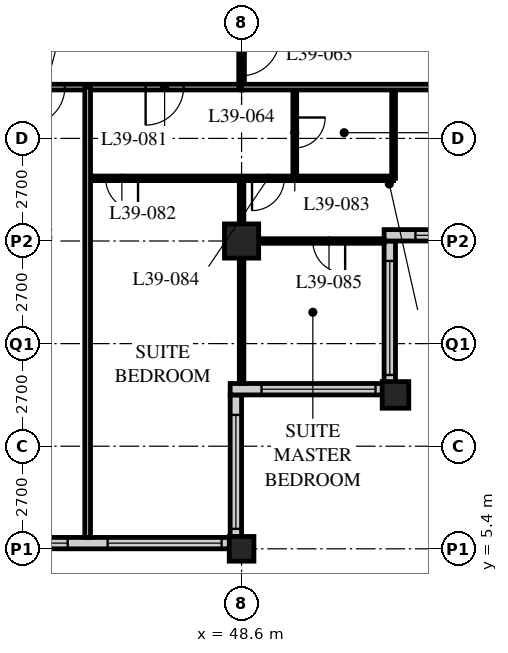
"""IFC4 building model, lengths in metres.
Left out: names, types, materials, properties, quantities, classifications, styles, units other than length and angle.
Written with IfcOpenShell. Run it as: python <this file> out.ifc"""

import sys

from ifc_helpers import new_model, si_unit, direction, frame, frame_2d, origin, origin_2d, place, context, subcontext, project, spatial, rectangle, hollow_rectangle, extrude, element, fill, save


model = new_model("IFC4")
c1 = context("Model", 3, precision=1e-05, world=origin(), true_north=direction((0.0, 1.0)))
c2 = subcontext(c1, "Body", "Model", "MODEL_VIEW")
j1 = project(units=[si_unit("LENGTHUNIT", "METRE"), si_unit("PLANEANGLEUNIT", "RADIAN")], contexts=[c1])
p1 = place(None, origin())
s1 = spatial("IfcSite", under=j1, at=p1, CompositionType="ELEMENT")
p2 = place(p1, origin())
s2 = spatial("IfcBuilding", under=s1, at=p2, CompositionType="ELEMENT")
p3 = place(p2, frame((0.0, 0.0, 151.0)))
s3 = spatial("IfcBuildingStorey", under=s2, at=p3, CompositionType="ELEMENT", Elevation=151.0)
p4 = place(p3, frame((48.6, 5.4, 0.0), z_axis=(0.0, 0.0, 1.0), x_axis=(1.0, 0.0, 0.0)))
e1 = element("IfcColumn", 1, at=p4, inside=s3, PredefinedType="COLUMN", context=c2, shape_type="SweptSolid", body=[
    extrude(hollow_rectangle(XDim=0.65, YDim=0.65, WallThickness=0.055, at=origin_2d()), origin(), (0.0, 0.0, 1.0), 3.4),
])
p5 = place(p3, frame((48.6, 13.5, 0.0), z_axis=(0.0, 0.0, 1.0), x_axis=(1.0, 0.0, 0.0)))
e2 = element("IfcColumn", 2, at=p5, inside=s3, PredefinedType="COLUMN", context=c2, shape_type="SweptSolid", body=[
    extrude(hollow_rectangle(XDim=0.9, YDim=0.9, WallThickness=0.1, at=origin_2d()), origin(), (0.0, 0.0, 1.0), 3.4),
])
p6 = place(p3, frame((52.65, 9.45, 0.0), z_axis=(0.0, 0.0, 1.0), x_axis=(1.0, 0.0, 0.0)))
e3 = element("IfcColumn", 3, at=p6, inside=s3, PredefinedType="COLUMN", context=c2, shape_type="SweptSolid", body=[
    extrude(hollow_rectangle(XDim=0.7, YDim=0.7, WallThickness=0.07, at=origin_2d()), origin(), (0.0, 0.0, 1.0), 3.4),
])
p7 = place(p3, frame((8.4, 5.55, 0.0), z_axis=(0.0, 0.0, 1.0), x_axis=(1.0, 0.0, 0.0)))
e4 = element("IfcWall", 4, at=p7, inside=s3, PredefinedType="SOLIDWALL", context=c2, shape_type="SweptSolid", body=[
    extrude(rectangle(XDim=40.2, YDim=0.3, at=frame_2d((20.1, 0.0))), origin(), (0.0, 0.0, 1.0), 3.19),
])
p8 = place(p7, frame((0.225, 0.0, 0.9)))
e5 = element("IfcOpeningElement", 5, at=p8, cuts=e4, PredefinedType="OPENING", context=c2, shape_type="SweptSolid", body=[
    extrude(rectangle(XDim=3.0, YDim=1.4, at=frame_2d((1.5, 0.7))), frame((0.0, 0.16, 0.0), z_axis=(0.0, -1.0, 0.0), x_axis=(1.0, 0.0, 0.0)), (0.0, 0.0, 1.0), 0.32),
])
p9 = place(p7, frame((4.275, 0.0, 0.9)))
e6 = element("IfcOpeningElement", 6, at=p9, cuts=e4, PredefinedType="OPENING", context=c2, shape_type="SweptSolid", body=[
    extrude(rectangle(XDim=3.0, YDim=1.4, at=frame_2d((1.5, 0.7))), frame((0.0, 0.16, 0.0), z_axis=(0.0, -1.0, 0.0), x_axis=(1.0, 0.0, 0.0)), (0.0, 0.0, 1.0), 0.32),
])
p10 = place(p7, frame((8.325, 0.0, 0.9)))
e7 = element("IfcOpeningElement", 7, at=p10, cuts=e4, PredefinedType="OPENING", context=c2, shape_type="SweptSolid", body=[
    extrude(rectangle(XDim=3.0, YDim=1.4, at=frame_2d((1.5, 0.7))), frame((0.0, 0.16, 0.0), z_axis=(0.0, -1.0, 0.0), x_axis=(1.0, 0.0, 0.0)), (0.0, 0.0, 1.0), 0.32),
])
p11 = place(p7, frame((12.375, 0.0, 0.9)))
e8 = element("IfcOpeningElement", 8, at=p11, cuts=e4, PredefinedType="OPENING", context=c2, shape_type="SweptSolid", body=[
    extrude(rectangle(XDim=3.0, YDim=1.4, at=frame_2d((1.5, 0.7))), frame((0.0, 0.16, 0.0), z_axis=(0.0, -1.0, 0.0), x_axis=(1.0, 0.0, 0.0)), (0.0, 0.0, 1.0), 0.32),
])
p12 = place(p7, frame((16.425, 0.0, 0.9)))
e9 = element("IfcOpeningElement", 9, at=p12, cuts=e4, PredefinedType="OPENING", context=c2, shape_type="SweptSolid", body=[
    extrude(rectangle(XDim=3.0, YDim=1.4, at=frame_2d((1.5, 0.7))), frame((0.0, 0.16, 0.0), z_axis=(0.0, -1.0, 0.0), x_axis=(1.0, 0.0, 0.0)), (0.0, 0.0, 1.0), 0.32),
])
p13 = place(p7, frame((20.475, 0.0, 0.9)))
e10 = element("IfcOpeningElement", 10, at=p13, cuts=e4, PredefinedType="OPENING", context=c2, shape_type="SweptSolid", body=[
    extrude(rectangle(XDim=3.0, YDim=1.4, at=frame_2d((1.5, 0.7))), frame((0.0, 0.16, 0.0), z_axis=(0.0, -1.0, 0.0), x_axis=(1.0, 0.0, 0.0)), (0.0, 0.0, 1.0), 0.32),
])
p14 = place(p7, frame((24.525, 0.0, 0.9)))
e11 = element("IfcOpeningElement", 11, at=p14, cuts=e4, PredefinedType="OPENING", context=c2, shape_type="SweptSolid", body=[
    extrude(rectangle(XDim=3.0, YDim=1.4, at=frame_2d((1.5, 0.7))), frame((0.0, 0.16, 0.0), z_axis=(0.0, -1.0, 0.0), x_axis=(1.0, 0.0, 0.0)), (0.0, 0.0, 1.0), 0.32),
])
p15 = place(p7, frame((28.575, 0.0, 0.9)))
e12 = element("IfcOpeningElement", 12, at=p15, cuts=e4, PredefinedType="OPENING", context=c2, shape_type="SweptSolid", body=[
    extrude(rectangle(XDim=3.0, YDim=1.4, at=frame_2d((1.5, 0.7))), frame((0.0, 0.16, 0.0), z_axis=(0.0, -1.0, 0.0), x_axis=(1.0, 0.0, 0.0)), (0.0, 0.0, 1.0), 0.32),
])
p16 = place(p7, frame((32.625, 0.0, 0.9)))
e13 = element("IfcOpeningElement", 13, at=p16, cuts=e4, PredefinedType="OPENING", context=c2, shape_type="SweptSolid", body=[
    extrude(rectangle(XDim=3.0, YDim=1.4, at=frame_2d((1.5, 0.7))), frame((0.0, 0.16, 0.0), z_axis=(0.0, -1.0, 0.0), x_axis=(1.0, 0.0, 0.0)), (0.0, 0.0, 1.0), 0.32),
])
p17 = place(p7, frame((36.675, 0.0, 0.9)))
e14 = element("IfcOpeningElement", 14, at=p17, cuts=e4, PredefinedType="OPENING", context=c2, shape_type="SweptSolid", body=[
    extrude(rectangle(XDim=3.0, YDim=1.4, at=frame_2d((1.5, 0.7))), frame((0.0, 0.16, 0.0), z_axis=(0.0, -1.0, 0.0), x_axis=(1.0, 0.0, 0.0)), (0.0, 0.0, 1.0), 0.32),
])
p18 = place(p3, frame((48.45, 5.7, 0.0), z_axis=(0.0, 0.0, 1.0), x_axis=(0.0, 1.0, 0.0)))
e15 = element("IfcWall", 15, at=p18, inside=s3, PredefinedType="SOLIDWALL", context=c2, shape_type="SweptSolid", body=[
    extrude(rectangle(XDim=3.75, YDim=0.3, at=frame_2d((1.875, 0.0))), origin(), (0.0, 0.0, 1.0), 3.19),
])
p19 = place(p18, frame((0.225, 0.0, 0.9)))
e16 = element("IfcOpeningElement", 16, at=p19, cuts=e15, PredefinedType="OPENING", context=c2, shape_type="SweptSolid", body=[
    extrude(rectangle(XDim=3.0, YDim=1.4, at=frame_2d((1.5, 0.7))), frame((0.0, 0.16, 0.0), z_axis=(0.0, -1.0, 0.0), x_axis=(1.0, 0.0, 0.0)), (0.0, 0.0, 1.0), 0.32),
])
p20 = place(p3, frame((48.3, 9.6, 0.0), z_axis=(0.0, 0.0, 1.0), x_axis=(1.0, 0.0, 0.0)))
e17 = element("IfcWall", 17, at=p20, inside=s3, PredefinedType="SOLIDWALL", context=c2, shape_type="SweptSolid", body=[
    extrude(rectangle(XDim=4.35, YDim=0.3, at=frame_2d((2.175, 0.0))), origin(), (0.0, 0.0, 1.0), 3.19),
])
p21 = place(p20, frame((0.825, 0.0, 0.9)))
e18 = element("IfcOpeningElement", 18, at=p21, cuts=e17, PredefinedType="OPENING", context=c2, shape_type="SweptSolid", body=[
    extrude(rectangle(XDim=3.0, YDim=1.4, at=frame_2d((1.5, 0.7))), frame((0.0, 0.16, 0.0), z_axis=(0.0, -1.0, 0.0), x_axis=(1.0, 0.0, 0.0)), (0.0, 0.0, 1.0), 0.32),
])
p22 = place(p3, frame((52.5, 9.75, 0.0), z_axis=(0.0, 0.0, 1.0), x_axis=(0.0, 1.0, 0.0)))
e19 = element("IfcWall", 19, at=p22, inside=s3, PredefinedType="SOLIDWALL", context=c2, shape_type="SweptSolid", body=[
    extrude(rectangle(XDim=3.75, YDim=0.3, at=frame_2d((1.875, 0.0))), origin(), (0.0, 0.0, 1.0), 3.19),
])
p23 = place(p22, frame((0.225, 0.0, 0.9)))
e20 = element("IfcOpeningElement", 20, at=p23, cuts=e19, PredefinedType="OPENING", context=c2, shape_type="SweptSolid", body=[
    extrude(rectangle(XDim=3.0, YDim=1.4, at=frame_2d((1.5, 0.7))), frame((0.0, 0.16, 0.0), z_axis=(0.0, -1.0, 0.0), x_axis=(1.0, 0.0, 0.0)), (0.0, 0.0, 1.0), 0.32),
])
p24 = place(p3, frame((52.35, 13.65, 0.0), z_axis=(0.0, 0.0, 1.0), x_axis=(1.0, 0.0, 0.0)))
e21 = element("IfcWall", 21, at=p24, inside=s3, PredefinedType="SOLIDWALL", context=c2, shape_type="SweptSolid", body=[
    extrude(rectangle(XDim=4.35, YDim=0.3, at=frame_2d((2.175, 0.0))), origin(), (0.0, 0.0, 1.0), 3.19),
])
p25 = place(p24, frame((0.825, 0.0, 0.9)))
e22 = element("IfcOpeningElement", 22, at=p25, cuts=e21, PredefinedType="OPENING", context=c2, shape_type="SweptSolid", body=[
    extrude(rectangle(XDim=3.0, YDim=1.4, at=frame_2d((1.5, 0.7))), frame((0.0, 0.16, 0.0), z_axis=(0.0, -1.0, 0.0), x_axis=(1.0, 0.0, 0.0)), (0.0, 0.0, 1.0), 0.32),
])
p26 = place(p3, frame((8.1, 17.55, 0.0), z_axis=(0.0, 0.0, 1.0), x_axis=(1.0, 0.0, 0.0)))
e23 = element("IfcWall", 23, at=p26, inside=s3, PredefinedType="PARTITIONING", context=c2, shape_type="SweptSolid", body=[
    extrude(rectangle(XDim=40.5, YDim=0.15, at=frame_2d((20.25, 0.0))), origin(), (0.0, 0.0, 1.0), 3.19),
])
p27 = place(p26, frame((10.0, 0.0, 0.0)))
e24 = element("IfcOpeningElement", 24, at=p27, cuts=e23, PredefinedType="OPENING", context=c2, shape_type="SweptSolid", body=[
    extrude(rectangle(XDim=1.0, YDim=2.1, at=frame_2d((0.5, 1.05))), frame((0.0, 0.085, 0.0), z_axis=(0.0, -1.0, 0.0), x_axis=(1.0, 0.0, 0.0)), (0.0, 0.0, 1.0), 0.17),
])
p28 = place(p26, frame((22.15, 0.0, 0.0)))
e25 = element("IfcOpeningElement", 25, at=p28, cuts=e23, PredefinedType="OPENING", context=c2, shape_type="SweptSolid", body=[
    extrude(rectangle(XDim=1.0, YDim=2.1, at=frame_2d((0.5, 1.05))), frame((0.0, 0.085, 0.0), z_axis=(0.0, -1.0, 0.0), x_axis=(1.0, 0.0, 0.0)), (0.0, 0.0, 1.0), 0.17),
])
p29 = place(p26, frame((30.8, 0.0, 0.0)))
e26 = element("IfcOpeningElement", 26, at=p29, cuts=e23, PredefinedType="OPENING", context=c2, shape_type="SweptSolid", body=[
    extrude(rectangle(XDim=1.0, YDim=2.1, at=frame_2d((0.5, 1.05))), frame((0.0, 0.085, 0.0), z_axis=(0.0, -1.0, 0.0), x_axis=(1.0, 0.0, 0.0)), (0.0, 0.0, 1.0), 0.17),
])
p30 = place(p26, frame((34.85, 0.0, 0.0)))
e27 = element("IfcOpeningElement", 27, at=p30, cuts=e23, PredefinedType="OPENING", context=c2, shape_type="SweptSolid", body=[
    extrude(rectangle(XDim=1.0, YDim=2.1, at=frame_2d((0.5, 1.05))), frame((0.0, 0.085, 0.0), z_axis=(0.0, -1.0, 0.0), x_axis=(1.0, 0.0, 0.0)), (0.0, 0.0, 1.0), 0.17),
])
p31 = place(p26, frame((1.525, 0.0, 0.0)))
e28 = element("IfcOpeningElement", 28, at=p31, cuts=e23, PredefinedType="OPENING", context=c2, shape_type="SweptSolid", body=[
    extrude(rectangle(XDim=1.0, YDim=2.1, at=frame_2d((0.5, 1.05))), frame((0.0, 0.085, 0.0), z_axis=(0.0, -1.0, 0.0), x_axis=(1.0, 0.0, 0.0)), (0.0, 0.0, 1.0), 0.17),
])
p32 = place(p26, frame((37.975, 0.0, 0.0)))
e29 = element("IfcOpeningElement", 29, at=p32, cuts=e23, PredefinedType="OPENING", context=c2, shape_type="SweptSolid", body=[
    extrude(rectangle(XDim=1.0, YDim=2.1, at=frame_2d((0.5, 1.05))), frame((0.0, 0.085, 0.0), z_axis=(0.0, -1.0, 0.0), x_axis=(1.0, 0.0, 0.0)), (0.0, 0.0, 1.0), 0.17),
])
p33 = place(p3, frame((48.6, 17.55, 0.0), z_axis=(0.0, 0.0, 1.0), x_axis=(0.0, 1.0, 0.0)))
e30 = element("IfcWall", 30, at=p33, inside=s3, PredefinedType="PARTITIONING", context=c2, shape_type="SweptSolid", body=[
    extrude(rectangle(XDim=28.35, YDim=0.15, at=frame_2d((14.175, 0.0))), origin(), (0.0, 0.0, 1.0), 2.42),
])
p34 = place(p33, frame((0.3, 0.0, 0.0)))
e31 = element("IfcOpeningElement", 31, at=p34, cuts=e30, PredefinedType="OPENING", context=c2, shape_type="SweptSolid", body=[
    extrude(rectangle(XDim=1.0, YDim=2.1, at=frame_2d((0.5, 1.05))), frame((0.0, 0.085, 0.0), z_axis=(0.0, -1.0, 0.0), x_axis=(1.0, 0.0, 0.0)), (0.0, 0.0, 1.0), 0.17),
])
p35 = place(p33, frame((6.5, 0.0, 0.0)))
e32 = element("IfcOpeningElement", 32, at=p35, cuts=e30, PredefinedType="OPENING", context=c2, shape_type="SweptSolid", body=[
    extrude(rectangle(XDim=1.0, YDim=2.1, at=frame_2d((0.5, 1.05))), frame((0.0, 0.085, 0.0), z_axis=(0.0, -1.0, 0.0), x_axis=(1.0, 0.0, 0.0)), (0.0, 0.0, 1.0), 0.17),
])
p36 = place(p33, frame((13.675, 0.0, 0.0)))
e33 = element("IfcOpeningElement", 33, at=p36, cuts=e30, PredefinedType="OPENING", context=c2, shape_type="SweptSolid", body=[
    extrude(rectangle(XDim=1.0, YDim=2.1, at=frame_2d((0.5, 1.05))), frame((0.0, 0.085, 0.0), z_axis=(0.0, -1.0, 0.0), x_axis=(1.0, 0.0, 0.0)), (0.0, 0.0, 1.0), 0.17),
])
p37 = place(p33, frame((22.7, 0.0, 0.0)))
e34 = element("IfcOpeningElement", 34, at=p37, cuts=e30, PredefinedType="OPENING", context=c2, shape_type="SweptSolid", body=[
    extrude(rectangle(XDim=1.0, YDim=2.1, at=frame_2d((0.5, 1.05))), frame((0.0, 0.085, 0.0), z_axis=(0.0, -1.0, 0.0), x_axis=(1.0, 0.0, 0.0)), (0.0, 0.0, 1.0), 0.17),
])
p38 = place(p33, frame((24.9, 0.0, 0.0)))
e35 = element("IfcOpeningElement", 35, at=p38, cuts=e30, PredefinedType="OPENING", context=c2, shape_type="SweptSolid", body=[
    extrude(rectangle(XDim=1.0, YDim=2.1, at=frame_2d((0.5, 1.05))), frame((0.0, 0.085, 0.0), z_axis=(0.0, -1.0, 0.0), x_axis=(1.0, 0.0, 0.0)), (0.0, 0.0, 1.0), 0.17),
])
p39 = place(p3, frame((44.55, 15.15, 0.0), z_axis=(0.0, 0.0, 1.0), x_axis=(1.0, 0.0, 0.0)))
e36 = element("IfcWall", 36, at=p39, inside=s3, PredefinedType="PARTITIONING", context=c2, shape_type="SweptSolid", body=[
    extrude(rectangle(XDim=8.05, YDim=0.12, at=frame_2d((4.025, 0.0))), origin(), (0.0, 0.0, 1.0), 3.19),
])
p40 = place(p39, frame((0.475, 0.0, 0.0)))
e37 = element("IfcOpeningElement", 37, at=p40, cuts=e36, PredefinedType="OPENING", context=c2, shape_type="SweptSolid", body=[
    extrude(rectangle(XDim=0.85, YDim=2.1, at=frame_2d((0.425, 1.05))), frame((0.0, 0.07, 0.0), z_axis=(0.0, -1.0, 0.0), x_axis=(1.0, 0.0, 0.0)), (0.0, 0.0, 1.0), 0.14),
])
p41 = place(p39, frame((4.325, 0.0, 0.0)))
e38 = element("IfcOpeningElement", 38, at=p41, cuts=e36, PredefinedType="OPENING", context=c2, shape_type="SweptSolid", body=[
    extrude(rectangle(XDim=0.85, YDim=2.1, at=frame_2d((0.425, 1.05))), frame((0.0, 0.07, 0.0), z_axis=(0.0, -1.0, 0.0), x_axis=(1.0, 0.0, 0.0)), (0.0, 0.0, 1.0), 0.14),
])
p42 = place(p3, frame((50.0, 17.55, 0.0), z_axis=(0.0, 0.0, 1.0), x_axis=(0.0, -1.0, 0.0)))
e39 = element("IfcWall", 39, at=p42, inside=s3, PredefinedType="PARTITIONING", context=c2, shape_type="SweptSolid", body=[
    extrude(rectangle(XDim=2.4, YDim=0.1, at=frame_2d((1.2, 0.0))), origin(), (0.0, 0.0, 1.0), 3.19),
])
p43 = place(p42, frame((0.8, 0.0, 0.0)))
e40 = element("IfcOpeningElement", 40, at=p43, cuts=e39, PredefinedType="OPENING", context=c2, shape_type="SweptSolid", body=[
    extrude(rectangle(XDim=0.8, YDim=2.1, at=frame_2d((0.4, 1.05))), frame((0.0, 0.06, 0.0), z_axis=(0.0, -1.0, 0.0), x_axis=(1.0, 0.0, 0.0)), (0.0, 0.0, 1.0), 0.12),
])
p44 = place(p3, frame((52.6, 17.55, 0.0), z_axis=(0.0, 0.0, 1.0), x_axis=(0.0, -1.0, 0.0)))
e41 = element("IfcWall", 41, at=p44, inside=s3, PredefinedType="PARTITIONING", context=c2, shape_type="SweptSolid", body=[
    extrude(rectangle(XDim=2.4, YDim=0.1, at=frame_2d((1.2, 0.0))), origin(), (0.0, 0.0, 1.0), 3.19),
])
p45 = place(p3, frame((48.6, 15.15, 0.0), z_axis=(0.0, 0.0, 1.0), x_axis=(0.0, -1.0, 0.0)))
e42 = element("IfcWall", 42, at=p45, inside=s3, PredefinedType="PARTITIONING", context=c2, shape_type="SweptSolid", body=[
    extrude(rectangle(XDim=5.4, YDim=0.12, at=frame_2d((2.7, 0.0))), origin(), (0.0, 0.0, 1.0), 2.42),
])
p46 = place(p3, frame((48.6, 13.5, 0.0), z_axis=(0.0, 0.0, 1.0), x_axis=(1.0, 0.0, 0.0)))
e43 = element("IfcWall", 43, at=p46, inside=s3, PredefinedType="PARTITIONING", context=c2, shape_type="SweptSolid", body=[
    extrude(rectangle(XDim=3.75, YDim=0.12, at=frame_2d((1.875, 0.0))), origin(), (0.0, 0.0, 1.0), 2.42),
])
p47 = place(p46, frame((1.875, 0.0, 0.0)))
e44 = element("IfcOpeningElement", 44, at=p47, cuts=e43, PredefinedType="OPENING", context=c2, shape_type="SweptSolid", body=[
    extrude(rectangle(XDim=0.85, YDim=2.1, at=frame_2d((0.425, 1.05))), frame((0.0, 0.07, 0.0), z_axis=(0.0, -1.0, 0.0), x_axis=(1.0, 0.0, 0.0)), (0.0, 0.0, 1.0), 0.14),
])
p48 = place(p3, frame((48.6, 17.55, 0.0), z_axis=(0.0, 0.0, 1.0), x_axis=(1.0, 0.0, 0.0)))
e45 = element("IfcWall", 45, at=p48, inside=s3, PredefinedType="PARTITIONING", context=c2, shape_type="SweptSolid", body=[
    extrude(rectangle(XDim=7.8, YDim=0.15, at=frame_2d((3.9, 0.0))), origin(), (0.0, 0.0, 1.0), 3.19),
])
p49 = place(p3, frame((44.55, 17.55, 0.0), z_axis=(0.0, 0.0, 1.0), x_axis=(0.0, -1.0, 0.0)))
e46 = element("IfcWall", 46, at=p49, inside=s3, PredefinedType="PARTITIONING", context=c2, shape_type="SweptSolid", body=[
    extrude(rectangle(XDim=11.85, YDim=0.15, at=frame_2d((5.925, 0.0))), origin(), (0.0, 0.0, 1.0), 3.19),
])
p50 = place(p16, origin())
e47 = element("IfcWindow", 47, at=p50, inside=s3, PartitioningType="SINGLE_PANEL", PredefinedType="WINDOW", context=c2, shape_type="SweptSolid", body=[
    extrude(rectangle(XDim=3.0, YDim=1.4, at=frame_2d((1.5, 0.7))), frame((0.0, 0.03, 0.0), z_axis=(0.0, -1.0, 0.0), x_axis=(1.0, 0.0, 0.0)), (0.0, 0.0, 1.0), 0.06),
])
fill(e13, e47)
p51 = place(p17, origin())
e48 = element("IfcWindow", 48, at=p51, inside=s3, PartitioningType="SINGLE_PANEL", PredefinedType="WINDOW", context=c2, shape_type="SweptSolid", body=[
    extrude(rectangle(XDim=3.0, YDim=1.4, at=frame_2d((1.5, 0.7))), frame((0.0, 0.03, 0.0), z_axis=(0.0, -1.0, 0.0), x_axis=(1.0, 0.0, 0.0)), (0.0, 0.0, 1.0), 0.06),
])
fill(e14, e48)
p52 = place(p19, origin())
e49 = element("IfcWindow", 49, at=p52, inside=s3, PartitioningType="SINGLE_PANEL", PredefinedType="WINDOW", context=c2, shape_type="SweptSolid", body=[
    extrude(rectangle(XDim=3.0, YDim=1.4, at=frame_2d((1.5, 0.7))), frame((0.0, 0.03, 0.0), z_axis=(0.0, -1.0, 0.0), x_axis=(1.0, 0.0, 0.0)), (0.0, 0.0, 1.0), 0.06),
])
fill(e16, e49)
p53 = place(p21, origin())
e50 = element("IfcWindow", 50, at=p53, inside=s3, PartitioningType="SINGLE_PANEL", PredefinedType="WINDOW", context=c2, shape_type="SweptSolid", body=[
    extrude(rectangle(XDim=3.0, YDim=1.4, at=frame_2d((1.5, 0.7))), frame((0.0, 0.03, 0.0), z_axis=(0.0, -1.0, 0.0), x_axis=(1.0, 0.0, 0.0)), (0.0, 0.0, 1.0), 0.06),
])
fill(e18, e50)
p54 = place(p23, origin())
e51 = element("IfcWindow", 51, at=p54, inside=s3, PartitioningType="SINGLE_PANEL", PredefinedType="WINDOW", context=c2, shape_type="SweptSolid", body=[
    extrude(rectangle(XDim=3.0, YDim=1.4, at=frame_2d((1.5, 0.7))), frame((0.0, 0.03, 0.0), z_axis=(0.0, -1.0, 0.0), x_axis=(1.0, 0.0, 0.0)), (0.0, 0.0, 1.0), 0.06),
])
fill(e20, e51)
p55 = place(p25, origin())
e52 = element("IfcWindow", 52, at=p55, inside=s3, PartitioningType="SINGLE_PANEL", PredefinedType="WINDOW", context=c2, shape_type="SweptSolid", body=[
    extrude(rectangle(XDim=3.0, YDim=1.4, at=frame_2d((1.5, 0.7))), frame((0.0, 0.03, 0.0), z_axis=(0.0, -1.0, 0.0), x_axis=(1.0, 0.0, 0.0)), (0.0, 0.0, 1.0), 0.06),
])
fill(e22, e52)
p56 = place(p30, origin())
e53 = element("IfcDoor", 53, at=p56, inside=s3, OperationType="SINGLE_SWING_RIGHT", PredefinedType="DOOR", context=c2, shape_type="SweptSolid", body=[
    extrude(rectangle(XDim=1.0, YDim=2.1, at=frame_2d((0.5, 1.05))), frame((0.0, 0.025, 0.0), z_axis=(0.0, -1.0, 0.0), x_axis=(1.0, 0.0, 0.0)), (0.0, 0.0, 1.0), 0.05),
])
fill(e27, e53)
p57 = place(p34, origin())
e54 = element("IfcDoor", 54, at=p57, inside=s3, OperationType="SINGLE_SWING_LEFT", PredefinedType="DOOR", context=c2, shape_type="SweptSolid", body=[
    extrude(rectangle(XDim=1.0, YDim=2.1, at=frame_2d((0.5, 1.05))), frame((0.0, 0.025, 0.0), z_axis=(0.0, -1.0, 0.0), x_axis=(1.0, 0.0, 0.0)), (0.0, 0.0, 1.0), 0.05),
])
fill(e31, e54)
p58 = place(p32, origin())
e55 = element("IfcDoor", 55, at=p58, inside=s3, OperationType="SINGLE_SWING_RIGHT", PredefinedType="DOOR", context=c2, shape_type="SweptSolid", body=[
    extrude(rectangle(XDim=1.0, YDim=2.1, at=frame_2d((0.5, 1.05))), frame((0.0, 0.025, 0.0), z_axis=(0.0, -1.0, 0.0), x_axis=(1.0, 0.0, 0.0)), (0.0, 0.0, 1.0), 0.05),
])
fill(e29, e55)
p59 = place(p40, origin())
e56 = element("IfcDoor", 56, at=p59, inside=s3, OperationType="SINGLE_SWING_LEFT", PredefinedType="DOOR", context=c2, shape_type="SweptSolid", body=[
    extrude(rectangle(XDim=0.85, YDim=2.1, at=frame_2d((0.425, 1.05))), frame((0.0, 0.025, 0.0), z_axis=(0.0, -1.0, 0.0), x_axis=(1.0, 0.0, 0.0)), (0.0, 0.0, 1.0), 0.05),
])
fill(e37, e56)
p60 = place(p43, origin())
e57 = element("IfcDoor", 57, at=p60, inside=s3, OperationType="SINGLE_SWING_LEFT", PredefinedType="DOOR", context=c2, shape_type="SweptSolid", body=[
    extrude(rectangle(XDim=0.8, YDim=2.1, at=frame_2d((0.4, 1.05))), frame((0.0, 0.025, 0.0), z_axis=(0.0, -1.0, 0.0), x_axis=(1.0, 0.0, 0.0)), (0.0, 0.0, 1.0), 0.05),
])
fill(e40, e57)
p61 = place(p41, origin())
e58 = element("IfcDoor", 58, at=p61, inside=s3, OperationType="SINGLE_SWING_RIGHT", PredefinedType="DOOR", context=c2, shape_type="SweptSolid", body=[
    extrude(rectangle(XDim=0.85, YDim=2.1, at=frame_2d((0.425, 1.05))), frame((0.0, 0.025, 0.0), z_axis=(0.0, -1.0, 0.0), x_axis=(1.0, 0.0, 0.0)), (0.0, 0.0, 1.0), 0.05),
])
fill(e38, e58)
p62 = place(p47, origin())
e59 = element("IfcDoor", 59, at=p62, inside=s3, OperationType="SINGLE_SWING_LEFT", PredefinedType="DOOR", context=c2, shape_type="SweptSolid", body=[
    extrude(rectangle(XDim=0.85, YDim=2.1, at=frame_2d((0.425, 1.05))), frame((0.0, 0.025, 0.0), z_axis=(0.0, -1.0, 0.0), x_axis=(1.0, 0.0, 0.0)), (0.0, 0.0, 1.0), 0.05),
])
fill(e44, e59)
save(model, sys.argv[1])
